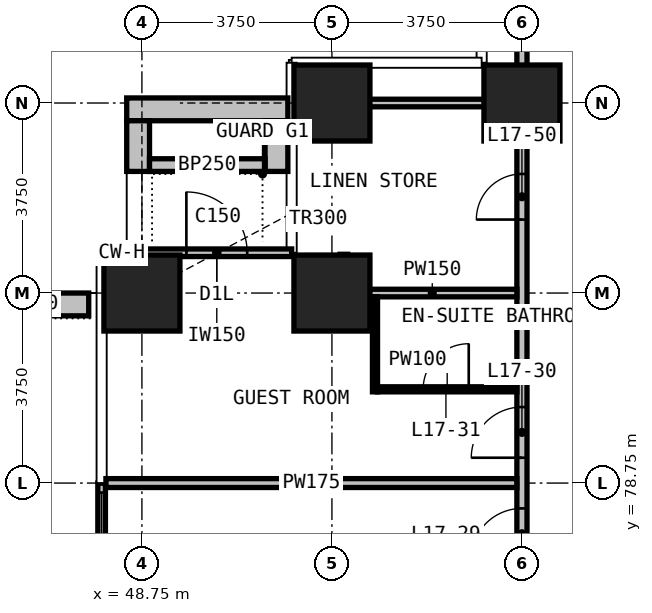
"""IFC4 building model, lengths in metres.
Left out: names, types, materials, properties, quantities, classifications, styles, units other than length and angle.
Written with IfcOpenShell. Run it as: python <this file> out.ifc"""

import sys

from ifc_helpers import new_model, si_unit, direction, frame, frame_2d, origin, origin_2d, place, context, subcontext, project, spatial, rectangle, extrude, element, fill, save


model = new_model("IFC4")
c1 = context("Model", 3, precision=1e-05, world=origin(), true_north=direction((0.0, 1.0)))
c2 = subcontext(c1, "Body", "Model", "MODEL_VIEW")
j1 = project(units=[si_unit("LENGTHUNIT", "METRE"), si_unit("PLANEANGLEUNIT", "RADIAN")], contexts=[c1])
p1 = place(None, origin())
s1 = spatial("IfcSite", under=j1, at=p1, CompositionType="ELEMENT")
p2 = place(p1, origin())
s2 = spatial("IfcBuilding", under=s1, at=p2, CompositionType="ELEMENT")
p3 = place(p2, frame((0.0, 0.0, 75.8)))
s3 = spatial("IfcBuildingStorey", under=s2, at=p3, CompositionType="ELEMENT", Elevation=75.8)
for number, where, z_axis, x_axis in (
    (1, (48.75, 82.5, 0.0), (0.0, 0.0, 1.0), (1.0, 0.0, 0.0)),
    (2, (52.5, 82.5, 0.0), (0.0, 0.0, 1.0), (1.0, 0.0, 0.0)),
    (3, (52.5, 86.25, 0.0), (0.0, 0.0, 1.0), (1.0, 0.0, 0.0)),
    (4, (56.25, 86.25, 0.0), (0.0, 0.0, 1.0), (1.0, 0.0, 0.0)),
):
    element("IfcColumn", number, at=place(p3, frame(where, z_axis=z_axis, x_axis=x_axis)), inside=s3, PredefinedType="COLUMN", context=c2, shape_type="SweptSolid", body=[
        extrude(rectangle(XDim=1.5, YDim=1.5, at=origin_2d()), origin(), (0.0, 0.0, 1.0), 3.3),
    ])
p4 = place(p3, frame((48.75, 83.295, 0.0), z_axis=(0.0, 0.0, 1.0), x_axis=(1.0, 0.0, 0.0)))
e5 = element("IfcWall", 5, at=p4, inside=s3, PredefinedType="SOLIDWALL", context=c2, shape_type="SweptSolid", body=[
    extrude(rectangle(XDim=2.955, YDim=0.15, at=frame_2d((1.478, 0.0))), origin(), (0.0, 0.0, 1.0), 3.0),
])
p5 = place(p4, frame((0.877, 0.0, 0.0)))
e6 = element("IfcOpeningElement", 6, at=p5, cuts=e5, PredefinedType="OPENING", context=c2, shape_type="SweptSolid", body=[
    extrude(rectangle(XDim=1.2, YDim=2.0, at=frame_2d((0.6, 1.0))), frame((0.0, 0.085, 0.0), z_axis=(0.0, -1.0, 0.0), x_axis=(1.0, 0.0, 0.0)), (0.0, 0.0, 1.0), 0.17),
])
p6 = place(p3, frame((47.955, 75.0, 0.0), z_axis=(0.0, 0.0, 1.0), x_axis=(0.0, 1.0, 0.0)))
e7 = element("IfcWall", 7, at=p6, inside=s3, PredefinedType="SOLIDWALL", context=c2, shape_type="SweptSolid", body=[
    extrude(rectangle(XDim=3.75, YDim=0.15, at=frame_2d((1.875, 0.0))), origin(), (0.0, 0.0, 1.0), 3.0),
])
p7 = place(p6, frame((1.275, 0.0, 0.0)))
e8 = element("IfcOpeningElement", 8, at=p7, cuts=e7, PredefinedType="OPENING", context=c2, shape_type="SweptSolid", body=[
    extrude(rectangle(XDim=1.2, YDim=2.4, at=frame_2d((0.6, 1.2))), frame((0.0, 0.085, 0.0), z_axis=(0.0, -1.0, 0.0), x_axis=(1.0, 0.0, 0.0)), (0.0, 0.0, 1.0), 0.17),
])
p8 = place(p6, frame((2.663, 0.0, 0.1)))
e9 = element("IfcOpeningElement", 9, at=p8, cuts=e7, PredefinedType="OPENING", context=c2, shape_type="SweptSolid", body=[
    extrude(rectangle(XDim=0.9, YDim=2.4, at=frame_2d((0.45, 1.2))), frame((0.0, 0.085, 0.0), z_axis=(0.0, -1.0, 0.0), x_axis=(1.0, 0.0, 0.0)), (0.0, 0.0, 1.0), 0.17),
])
p9 = place(p3, frame((48.45, 86.125, 0.0), z_axis=(0.0, 0.0, 1.0), x_axis=(1.0, 0.0, 0.0)))
e10 = element("IfcWall", 10, at=p9, inside=s3, PredefinedType="USERDEFINED", context=c2, shape_type="SweptSolid", body=[
    extrude(rectangle(XDim=3.18, YDim=0.45, at=frame_2d((1.59, 0.0))), origin(), (0.0, 0.0, 1.0), 1.1),
])
for number, where, z_axis, x_axis in (
    (11, (48.675, 84.9, 0.0), (0.0, 0.0, 1.0), (0.0, 1.0, 0.0)),
    (12, (51.405, 84.9, 0.0), (0.0, 0.0, 1.0), (0.0, 1.0, 0.0)),
):
    element("IfcWall", number, at=place(p3, frame(where, z_axis=z_axis, x_axis=x_axis)), inside=s3, PredefinedType="USERDEFINED", context=c2, shape_type="SweptSolid", body=[
        extrude(rectangle(XDim=1.0, YDim=0.45, at=frame_2d((0.5, 0.0))), origin(), (0.0, 0.0, 1.0), 1.1),
    ])
p10 = place(p3, frame((48.9, 85.025, 0.0), z_axis=(0.0, 0.0, 1.0), x_axis=(1.0, 0.0, 0.0)))
e13 = element("IfcWall", 13, at=p10, inside=s3, PredefinedType="USERDEFINED", context=c2, shape_type="SweptSolid", body=[
    extrude(rectangle(XDim=2.28, YDim=0.25, at=frame_2d((1.14, 0.0))), origin(), (0.0, 0.0, 1.0), 1.0),
])
p11 = place(p3, frame((47.7, 82.275, 0.0), z_axis=(0.0, 0.0, 1.0), x_axis=(-1.0, 0.0, 0.0)))
e14 = element("IfcWall", 14, at=p11, inside=s3, PredefinedType="USERDEFINED", context=c2, shape_type="SweptSolid", body=[
    extrude(rectangle(XDim=2.35, YDim=0.45, at=frame_2d((1.175, 0.0))), origin(), (0.0, 0.0, 1.0), 1.1),
])
p12 = place(p3, frame((56.25, 52.4, 0.0), z_axis=(0.0, 0.0, 1.0), x_axis=(0.0, 1.0, 0.0)))
e15 = element("IfcWall", 15, at=p12, inside=s3, PredefinedType="PARTITIONING", context=c2, shape_type="SweptSolid", body=[
    extrude(rectangle(XDim=33.925, YDim=0.2, at=frame_2d((16.962, 0.0))), origin(), (0.0, 0.0, 1.0), 3.0),
])
p13 = place(p12, frame((2.35, 0.0, 0.0)))
e16 = element("IfcOpeningElement", 16, at=p13, cuts=e15, PredefinedType="OPENING", context=c2, shape_type="SweptSolid", body=[
    extrude(rectangle(XDim=1.0, YDim=2.2, at=frame_2d((0.5, 1.1))), frame((0.0, 0.11, 0.0), z_axis=(0.0, -1.0, 0.0), x_axis=(1.0, 0.0, 0.0)), (0.0, 0.0, 1.0), 0.22),
])
p14 = place(p12, frame((4.35, 0.0, 0.0)))
e17 = element("IfcOpeningElement", 17, at=p14, cuts=e15, PredefinedType="OPENING", context=c2, shape_type="SweptSolid", body=[
    extrude(rectangle(XDim=1.0, YDim=2.2, at=frame_2d((0.5, 1.1))), frame((0.0, 0.11, 0.0), z_axis=(0.0, -1.0, 0.0), x_axis=(1.0, 0.0, 0.0)), (0.0, 0.0, 1.0), 0.22),
])
p15 = place(p12, frame((9.85, 0.0, 0.0)))
e18 = element("IfcOpeningElement", 18, at=p15, cuts=e15, PredefinedType="OPENING", context=c2, shape_type="SweptSolid", body=[
    extrude(rectangle(XDim=1.0, YDim=2.2, at=frame_2d((0.5, 1.1))), frame((0.0, 0.11, 0.0), z_axis=(0.0, -1.0, 0.0), x_axis=(1.0, 0.0, 0.0)), (0.0, 0.0, 1.0), 0.22),
])
p16 = place(p12, frame((11.85, 0.0, 0.0)))
e19 = element("IfcOpeningElement", 19, at=p16, cuts=e15, PredefinedType="OPENING", context=c2, shape_type="SweptSolid", body=[
    extrude(rectangle(XDim=1.0, YDim=2.2, at=frame_2d((0.5, 1.1))), frame((0.0, 0.11, 0.0), z_axis=(0.0, -1.0, 0.0), x_axis=(1.0, 0.0, 0.0)), (0.0, 0.0, 1.0), 0.22),
])
p17 = place(p12, frame((17.35, 0.0, 0.0)))
e20 = element("IfcOpeningElement", 20, at=p17, cuts=e15, PredefinedType="OPENING", context=c2, shape_type="SweptSolid", body=[
    extrude(rectangle(XDim=1.0, YDim=2.2, at=frame_2d((0.5, 1.1))), frame((0.0, 0.11, 0.0), z_axis=(0.0, -1.0, 0.0), x_axis=(1.0, 0.0, 0.0)), (0.0, 0.0, 1.0), 0.22),
])
p18 = place(p12, frame((19.35, 0.0, 0.0)))
e21 = element("IfcOpeningElement", 21, at=p18, cuts=e15, PredefinedType="OPENING", context=c2, shape_type="SweptSolid", body=[
    extrude(rectangle(XDim=1.0, YDim=2.2, at=frame_2d((0.5, 1.1))), frame((0.0, 0.11, 0.0), z_axis=(0.0, -1.0, 0.0), x_axis=(1.0, 0.0, 0.0)), (0.0, 0.0, 1.0), 0.22),
])
p19 = place(p12, frame((24.85, 0.0, 0.0)))
e22 = element("IfcOpeningElement", 22, at=p19, cuts=e15, PredefinedType="OPENING", context=c2, shape_type="SweptSolid", body=[
    extrude(rectangle(XDim=1.0, YDim=2.2, at=frame_2d((0.5, 1.1))), frame((0.0, 0.11, 0.0), z_axis=(0.0, -1.0, 0.0), x_axis=(1.0, 0.0, 0.0)), (0.0, 0.0, 1.0), 0.22),
])
p20 = place(p12, frame((26.85, 0.0, 0.0)))
e23 = element("IfcOpeningElement", 23, at=p20, cuts=e15, PredefinedType="OPENING", context=c2, shape_type="SweptSolid", body=[
    extrude(rectangle(XDim=1.0, YDim=2.2, at=frame_2d((0.5, 1.1))), frame((0.0, 0.11, 0.0), z_axis=(0.0, -1.0, 0.0), x_axis=(1.0, 0.0, 0.0)), (0.0, 0.0, 1.0), 0.22),
])
p21 = place(p12, frame((31.55, 0.0, 0.0)))
e24 = element("IfcOpeningElement", 24, at=p21, cuts=e15, PredefinedType="OPENING", context=c2, shape_type="SweptSolid", body=[
    extrude(rectangle(XDim=0.9, YDim=2.2, at=frame_2d((0.45, 1.1))), frame((0.0, 0.11, 0.0), z_axis=(0.0, -1.0, 0.0), x_axis=(1.0, 0.0, 0.0)), (0.0, 0.0, 1.0), 0.22),
])
p22 = place(p3, frame((56.25, 86.28, 0.0), z_axis=(0.0, 0.0, 1.0), x_axis=(0.0, 1.0, 0.0)))
e25 = element("IfcWall", 25, at=p22, inside=s3, PredefinedType="PARTITIONING", context=c2, shape_type="SweptSolid", body=[
    extrude(rectangle(XDim=4.365, YDim=0.2, at=frame_2d((2.183, 0.0))), origin(), (0.0, 0.0, 1.0), 3.0),
])
p23 = place(p3, frame((48.04, 78.75, 0.0), z_axis=(0.0, 0.0, 1.0), x_axis=(1.0, 0.0, 0.0)))
e26 = element("IfcWall", 26, at=p23, inside=s3, PredefinedType="PARTITIONING", context=c2, shape_type="SweptSolid", body=[
    extrude(rectangle(XDim=8.11, YDim=0.175, at=frame_2d((4.055, 0.0))), origin(), (0.0, 0.0, 1.0), 3.0),
])
p24 = place(p3, frame((52.81, 82.5, 0.0), z_axis=(0.0, 0.0, 1.0), x_axis=(1.0, 0.0, 0.0)))
e27 = element("IfcWall", 27, at=p24, inside=s3, PredefinedType="PARTITIONING", context=c2, shape_type="SweptSolid", body=[
    extrude(rectangle(XDim=3.34, YDim=0.15, at=frame_2d((1.67, 0.0))), origin(), (0.0, 0.0, 1.0), 3.0),
])
p25 = place(p3, frame((51.855, 86.25, 0.0), z_axis=(0.0, 0.0, 1.0), x_axis=(1.0, 0.0, 0.0)))
e28 = element("IfcWall", 28, at=p25, inside=s3, PredefinedType="PARTITIONING", context=c2, shape_type="SweptSolid", body=[
    extrude(rectangle(XDim=4.295, YDim=0.15, at=frame_2d((2.147, 0.0))), origin(), (0.0, 0.0, 1.0), 3.0),
])
p26 = place(p3, frame((52.735, 82.425, 0.0), z_axis=(0.0, 0.0, 1.0), x_axis=(0.0, 1.0, 0.0)))
e29 = element("IfcWall", 29, at=p26, inside=s3, PredefinedType="PARTITIONING", context=c2, shape_type="SweptSolid", body=[
    extrude(rectangle(XDim=0.84, YDim=0.15, at=frame_2d((0.42, 0.0))), origin(), (0.0, 0.0, 1.0), 3.0),
])
p27 = place(p3, frame((53.4, 80.6, 0.0), z_axis=(0.0, 0.0, 1.0), x_axis=(1.0, 0.0, 0.0)))
e30 = element("IfcWall", 30, at=p27, inside=s3, PredefinedType="PARTITIONING", context=c2, shape_type="SweptSolid", body=[
    extrude(rectangle(XDim=2.75, YDim=0.1, at=frame_2d((1.375, 0.0))), origin(), (0.0, 0.0, 1.0), 3.0),
])
p28 = place(p27, frame((0.9, 0.0, 0.0)))
e31 = element("IfcOpeningElement", 31, at=p28, cuts=e30, PredefinedType="OPENING", context=c2, shape_type="SweptSolid", body=[
    extrude(rectangle(XDim=0.9, YDim=2.2, at=frame_2d((0.45, 1.1))), frame((0.0, 0.06, 0.0), z_axis=(0.0, -1.0, 0.0), x_axis=(1.0, 0.0, 0.0)), (0.0, 0.0, 1.0), 0.12),
])
p29 = place(p3, frame((53.35, 80.55, 0.0), z_axis=(0.0, 0.0, 1.0), x_axis=(0.0, 1.0, 0.0)))
e32 = element("IfcWall", 32, at=p29, inside=s3, PredefinedType="PARTITIONING", context=c2, shape_type="SweptSolid", body=[
    extrude(rectangle(XDim=1.875, YDim=0.1, at=frame_2d((0.938, 0.0))), origin(), (0.0, 0.0, 1.0), 3.0),
])
p30 = place(p5, origin())
e33 = element("IfcDoor", 33, at=p30, inside=s3, OperationType="SINGLE_SWING_LEFT", PredefinedType="DOOR", context=c2, shape_type="SweptSolid", body=[
    extrude(rectangle(XDim=1.2, YDim=2.0, at=frame_2d((0.6, 1.0))), frame((0.0, 0.025, 0.0), z_axis=(0.0, -1.0, 0.0), x_axis=(1.0, 0.0, 0.0)), (0.0, 0.0, 1.0), 0.05),
])
fill(e6, e33)
p31 = place(p8, origin())
e34 = element("IfcWindow", 34, at=p31, inside=s3, PartitioningType="SINGLE_PANEL", PredefinedType="WINDOW", context=c2, shape_type="SweptSolid", body=[
    extrude(rectangle(XDim=0.9, YDim=2.4, at=frame_2d((0.45, 1.2))), frame((0.0, 0.03, 0.0), z_axis=(0.0, -1.0, 0.0), x_axis=(1.0, 0.0, 0.0)), (0.0, 0.0, 1.0), 0.06),
])
fill(e9, e34)
p32 = place(p19, origin())
e35 = element("IfcDoor", 35, at=p32, inside=s3, OperationType="SINGLE_SWING_LEFT", PredefinedType="DOOR", context=c2, shape_type="SweptSolid", body=[
    extrude(rectangle(XDim=1.0, YDim=2.2, at=frame_2d((0.5, 1.1))), frame((0.0, 0.025, 0.0), z_axis=(0.0, -1.0, 0.0), x_axis=(1.0, 0.0, 0.0)), (0.0, 0.0, 1.0), 0.05),
])
fill(e22, e35)
p33 = place(p20, origin())
e36 = element("IfcDoor", 36, at=p33, inside=s3, OperationType="SINGLE_SWING_LEFT", PredefinedType="DOOR", context=c2, shape_type="SweptSolid", body=[
    extrude(rectangle(XDim=1.0, YDim=2.2, at=frame_2d((0.5, 1.1))), frame((0.0, 0.025, 0.0), z_axis=(0.0, -1.0, 0.0), x_axis=(1.0, 0.0, 0.0)), (0.0, 0.0, 1.0), 0.05),
])
fill(e23, e36)
p34 = place(p28, origin())
e37 = element("IfcDoor", 37, at=p34, inside=s3, OperationType="SINGLE_SWING_RIGHT", PredefinedType="DOOR", context=c2, shape_type="SweptSolid", body=[
    extrude(rectangle(XDim=0.9, YDim=2.2, at=frame_2d((0.45, 1.1))), frame((0.0, 0.025, 0.0), z_axis=(0.0, -1.0, 0.0), x_axis=(1.0, 0.0, 0.0)), (0.0, 0.0, 1.0), 0.05),
])
fill(e31, e37)
p35 = place(p21, origin())
e38 = element("IfcDoor", 38, at=p35, inside=s3, OperationType="SINGLE_SWING_LEFT", PredefinedType="DOOR", context=c2, shape_type="SweptSolid", body=[
    extrude(rectangle(XDim=0.9, YDim=2.2, at=frame_2d((0.45, 1.1))), frame((0.0, 0.025, 0.0), z_axis=(0.0, -1.0, 0.0), x_axis=(1.0, 0.0, 0.0)), (0.0, 0.0, 1.0), 0.05),
])
fill(e24, e38)
save(model, sys.argv[1])
